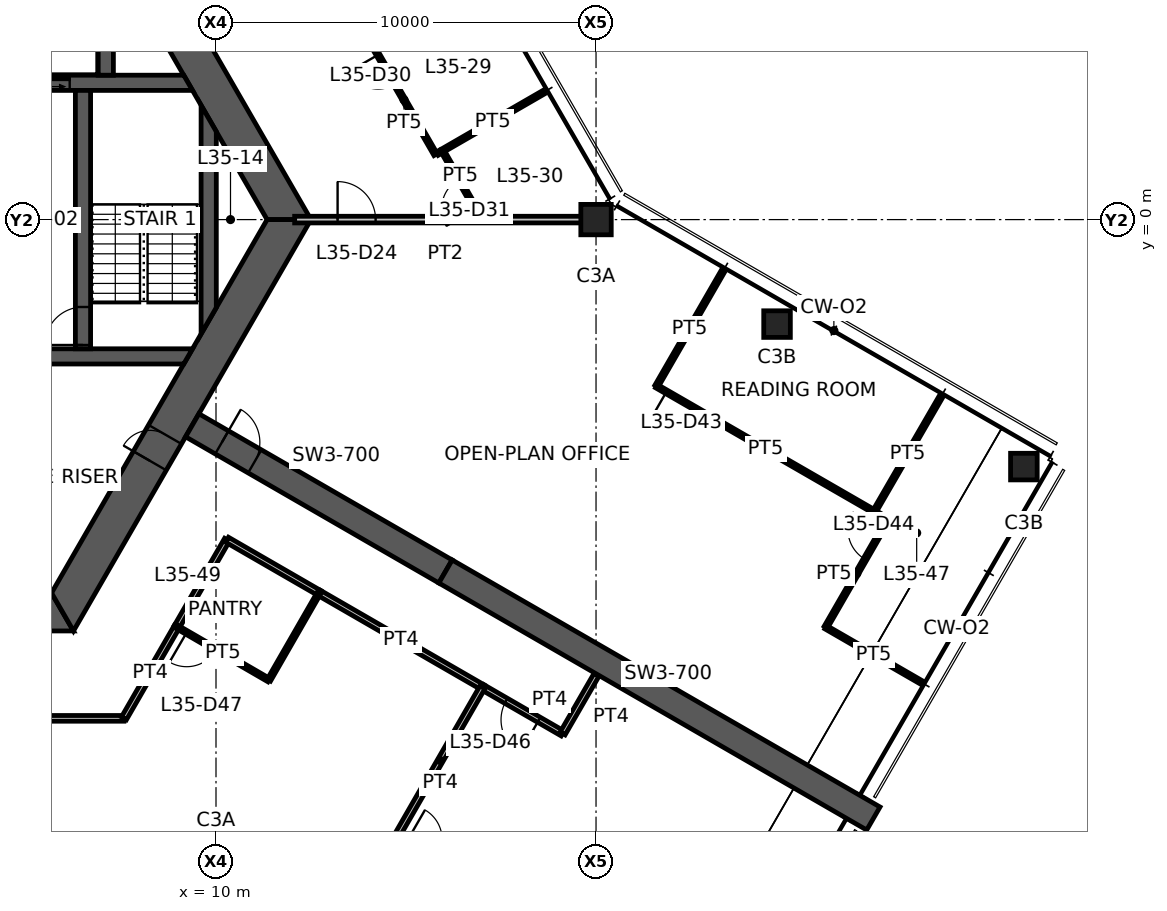
"""IFC4 building model, lengths in metres.
Left out: names, types, materials, properties, quantities, classifications, styles, units other than length and angle.
Written with IfcOpenShell. Run it as: python <this file> out.ifc"""

import sys

from ifc_helpers import new_model, si_unit, direction, frame, frame_2d, origin, origin_2d, place, context, subcontext, project, spatial, polyline, rectangle, hollow_rectangle, outline, extrude, element, fill, save


model = new_model("IFC4")
c1 = context("Model", 3, precision=1e-05, world=origin(), true_north=direction((0.0, 1.0)))
c2 = subcontext(c1, "Body", "Model", "MODEL_VIEW")
j1 = project(units=[si_unit("LENGTHUNIT", "METRE"), si_unit("PLANEANGLEUNIT", "RADIAN")], contexts=[c1])
p1 = place(None, origin())
s1 = spatial("IfcSite", under=j1, at=p1, CompositionType="ELEMENT")
p2 = place(p1, origin())
s2 = spatial("IfcBuilding", under=s1, at=p2, CompositionType="ELEMENT")
p3 = place(p2, frame((0.0, 0.0, 140.9)))
s3 = spatial("IfcBuildingStorey", under=s2, at=p3, CompositionType="ELEMENT", Elevation=140.9)
p4 = place(p3, frame((20.0, 0.0, 0.0), z_axis=(0.0, 0.0, 1.0), x_axis=(1.0, 0.0, 0.0)))
e1 = element("IfcColumn", 1, at=p4, inside=s3, PredefinedType="COLUMN", context=c2, shape_type="SweptSolid", body=[
    extrude(hollow_rectangle(XDim=0.8, YDim=0.8, WallThickness=0.045, at=origin_2d()), origin(), (0.0, 0.0, 1.0), 3.9),
])
for number, where, z_axis, x_axis in (
    (2, (24.763, -2.75, 0.0), (0.0, 0.0, 1.0), (1.0, 0.0, 0.0)),
    (3, (31.258, -6.5, 0.0), (0.0, 0.0, 1.0), (1.0, 0.0, 0.0)),
):
    element("IfcColumn", number, at=place(p3, frame(where, z_axis=z_axis, x_axis=x_axis)), inside=s3, PredefinedType="COLUMN", context=c2, shape_type="SweptSolid", body=[
        extrude(hollow_rectangle(XDim=0.7, YDim=0.7, WallThickness=0.036, at=origin_2d()), origin(), (0.0, 0.0, 1.0), 3.9),
    ])
p5 = place(p3, frame((11.922, 0.0, 0.0), z_axis=(0.0, 0.0, 1.0), x_axis=(-0.500004296715, 0.866022923061, 0.0)))
e4 = element("IfcWall", 4, at=p5, inside=s3, PredefinedType="SHEAR", context=c2, shape_type="SweptSolid", body=[
    extrude(outline(polyline([(-0.289, -0.5), (5.835, -0.5), (6.635, -0.5), (12.211, -0.5), (11.634, 0.5), (6.635, 0.5), (5.835, 0.5), (0.289, 0.5), (-0.289, -0.5)])), origin(), (0.0, 0.0, 1.0), 3.9),
])
p6 = place(p5, frame((5.835, 0.0, 0.0)))
e5 = element("IfcOpeningElement", 5, at=p6, cuts=e4, PredefinedType="OPENING", context=c2, shape_type="SweptSolid", body=[
    extrude(rectangle(XDim=0.8, YDim=2.1, at=frame_2d((0.4, 1.05))), frame((0.0, 0.51, 0.0), z_axis=(0.0, -1.0, 0.0), x_axis=(1.0, 0.0, 0.0)), (0.0, 0.0, 1.0), 1.02),
])
p7 = place(p3, frame((-5.961, -10.325, 0.0), z_axis=(0.0, 0.0, 1.0), x_axis=(1.0, 0.0, 0.0)))
e6 = element("IfcWall", 6, at=p7, inside=s3, PredefinedType="SHEAR", context=c2, shape_type="SweptSolid", body=[
    extrude(outline(polyline([(-0.289, -0.5), (5.461, -0.5), (6.461, -0.5), (12.211, -0.5), (11.634, 0.5), (6.461, 0.5), (5.461, 0.5), (0.289, 0.5), (-0.289, -0.5)])), origin(), (0.0, 0.0, 1.0), 3.9),
])
p8 = place(p7, frame((5.461, 0.0, 0.0)))
e7 = element("IfcOpeningElement", 7, at=p8, cuts=e6, PredefinedType="OPENING", context=c2, shape_type="SweptSolid", body=[
    extrude(rectangle(XDim=1.0, YDim=2.1, at=frame_2d((0.5, 1.05))), frame((0.0, 0.51, 0.0), z_axis=(0.0, -1.0, 0.0), x_axis=(1.0, 0.0, 0.0)), (0.0, 0.0, 1.0), 1.02),
])
p9 = place(p3, frame((5.961, -10.325, 0.0), z_axis=(0.0, 0.0, 1.0), x_axis=(0.500004296715, 0.866022923061, 0.0)))
e8 = element("IfcWall", 8, at=p9, inside=s3, PredefinedType="SHEAR", context=c2, shape_type="SweptSolid", body=[
    extrude(outline(polyline([(-0.289, -0.5), (4.594, -0.5), (5.394, -0.5), (12.211, -0.5), (11.634, 0.5), (5.394, 0.5), (4.594, 0.5), (0.289, 0.5), (-0.289, -0.5)])), origin(), (0.0, 0.0, 1.0), 3.9),
])
p10 = place(p9, frame((4.594, 0.0, 0.0)))
e9 = element("IfcOpeningElement", 9, at=p10, cuts=e8, PredefinedType="OPENING", context=c2, shape_type="SweptSolid", body=[
    extrude(rectangle(XDim=0.8, YDim=2.1, at=frame_2d((0.4, 1.05))), frame((0.0, 0.51, 0.0), z_axis=(0.0, -1.0, 0.0), x_axis=(1.0, 0.0, 0.0)), (0.0, 0.0, 1.0), 1.02),
])
p11 = place(p3, frame((9.375, -5.413, 0.0), z_axis=(0.0, 0.0, 1.0), x_axis=(0.866032377459, -0.499987921047, 0.0)))
e10 = element("IfcWall", 10, at=p11, inside=s3, PredefinedType="SHEAR", context=c2, shape_type="SweptSolid", body=[
    extrude(rectangle(XDim=7.696, YDim=0.7, at=frame_2d((3.848, 0.0))), origin(), (0.0, 0.0, 1.0), 3.9),
])
p12 = place(p11, frame((0.9, 0.0, 0.0)))
e11 = element("IfcOpeningElement", 11, at=p12, cuts=e10, PredefinedType="OPENING", context=c2, shape_type="SweptSolid", body=[
    extrude(rectangle(XDim=1.0, YDim=2.1, at=frame_2d((0.5, 1.05))), frame((0.0, 0.36, 0.0), z_axis=(0.0, -1.0, 0.0), x_axis=(1.0, 0.0, 0.0)), (0.0, 0.0, 1.0), 0.72),
])
p13 = place(p3, frame((16.039, -9.26, 0.0), z_axis=(0.0, 0.0, 1.0), x_axis=(0.866024837091, -0.50000098154, 0.0)))
e12 = element("IfcWall", 12, at=p13, inside=s3, PredefinedType="SHEAR", context=c2, shape_type="SweptSolid", body=[
    extrude(rectangle(XDim=13.0, YDim=0.7, at=frame_2d((6.5, 0.0))), origin(), (0.0, 0.0, 1.0), 3.9),
])
p14 = place(p3, frame((1.4, 3.6, 0.0), z_axis=(0.0, 0.0, 1.0), x_axis=(1.0, 0.0, 0.0)))
e13 = element("IfcWall", 13, at=p14, inside=s3, PredefinedType="SHEAR", context=c2, shape_type="SweptSolid", body=[
    extrude(outline(polyline([(0.0, -0.2), (3.45, -0.2), (4.75, -0.2), (7.982, -0.2), (7.751, 0.2), (4.75, 0.2), (3.45, 0.2), (0.0, 0.2), (0.0, -0.2)])), origin(), (0.0, 0.0, 1.0), 3.9),
])
p15 = place(p14, frame((3.45, 0.0, 0.0)))
e14 = element("IfcOpeningElement", 14, at=p15, cuts=e13, PredefinedType="OPENING", context=c2, shape_type="SweptSolid", body=[
    extrude(rectangle(XDim=1.3, YDim=2.1, at=frame_2d((0.65, 1.05))), frame((0.0, 0.21, 0.0), z_axis=(0.0, -1.0, 0.0), x_axis=(1.0, 0.0, 0.0)), (0.0, 0.0, 1.0), 0.42),
])
p16 = place(p3, frame((1.4, -3.6, 0.0), z_axis=(0.0, 0.0, 1.0), x_axis=(1.0, 0.0, 0.0)))
e15 = element("IfcWall", 15, at=p16, inside=s3, PredefinedType="SHEAR", context=c2, shape_type="SweptSolid", body=[
    extrude(outline(polyline([(0.0, -0.2), (1.1, -0.2), (2.2, -0.2), (7.751, -0.2), (7.982, 0.2), (2.2, 0.2), (1.1, 0.2), (0.0, 0.2), (0.0, -0.2)])), origin(), (0.0, 0.0, 1.0), 3.9),
])
p17 = place(p16, frame((1.1, 0.0, 0.0)))
e16 = element("IfcOpeningElement", 16, at=p17, cuts=e15, PredefinedType="OPENING", context=c2, shape_type="SweptSolid", body=[
    extrude(rectangle(XDim=1.1, YDim=2.1, at=frame_2d((0.55, 1.05))), frame((0.0, 0.21, 0.0), z_axis=(0.0, -1.0, 0.0), x_axis=(1.0, 0.0, 0.0)), (0.0, 0.0, 1.0), 0.42),
])
p18 = place(p3, frame((6.5, -3.4, 0.0), z_axis=(0.0, 0.0, 1.0), x_axis=(0.0, 1.0, 0.0)))
e17 = element("IfcWall", 17, at=p18, inside=s3, PredefinedType="SHEAR", context=c2, shape_type="SweptSolid", body=[
    extrude(rectangle(XDim=6.8, YDim=0.4, at=frame_2d((3.4, 0.0))), origin(), (0.0, 0.0, 1.0), 3.9),
])
p19 = place(p18, frame((0.1, 0.0, 0.0)))
e18 = element("IfcOpeningElement", 18, at=p19, cuts=e17, PredefinedType="OPENING", context=c2, shape_type="SweptSolid", body=[
    extrude(rectangle(XDim=1.0, YDim=2.1, at=frame_2d((0.5, 1.05))), frame((0.0, 0.21, 0.0), z_axis=(0.0, -1.0, 0.0), x_axis=(1.0, 0.0, 0.0)), (0.0, 0.0, 1.0), 0.42),
])
p20 = place(p3, frame((7.1, 3.8, 0.0), z_axis=(0.0, 0.0, 1.0), x_axis=(0.0, 1.0, 0.0)))
e19 = element("IfcWall", 19, at=p20, inside=s3, PredefinedType="SHEAR", context=c2, shape_type="SweptSolid", body=[
    extrude(outline(polyline([(0.0, -0.2), (3.206, -0.2), (3.4, 0.0), (3.4, 0.2), (0.0, 0.2), (0.0, -0.2)])), origin(), (0.0, 0.0, 1.0), 3.9),
])
p21 = place(p3, frame((9.808, -2.662, 0.0), z_axis=(0.0, 0.0, 1.0), x_axis=(0.0, 1.0, 0.0)))
e20 = element("IfcWall", 20, at=p21, inside=s3, PredefinedType="SHEAR", context=c2, shape_type="SweptSolid", body=[
    extrude(outline(polyline([(0.346, -0.2), (4.978, -0.2), (5.671, 0.2), (-0.346, 0.2), (0.346, -0.2)])), origin(), (0.0, 0.0, 1.0), 3.9),
])
p22 = place(p3, frame((12.07, 0.0, 0.0), z_axis=(0.0, 0.0, 1.0), x_axis=(1.0, 0.0, 0.0)))
e21 = element("IfcWall", 21, at=p22, inside=s3, PredefinedType="PARTITIONING", context=c2, shape_type="SweptSolid", body=[
    extrude(rectangle(XDim=7.93, YDim=0.175, at=frame_2d((3.965, 0.0))), origin(), (0.0, 0.0, 1.0), 3.05),
])
p23 = place(p22, frame((1.13, 0.0, 0.0)))
e22 = element("IfcOpeningElement", 22, at=p23, cuts=e21, PredefinedType="OPENING", context=c2, shape_type="SweptSolid", body=[
    extrude(rectangle(XDim=1.0, YDim=2.1, at=frame_2d((0.5, 1.05))), frame((0.0, 0.098, 0.0), z_axis=(0.0, -1.0, 0.0), x_axis=(1.0, 0.0, 0.0)), (0.0, 0.0, 1.0), 0.195),
])
p24 = place(p3, frame((18.62, 3.351, 0.0), z_axis=(0.0, 0.0, 1.0), x_axis=(-0.866043267704, -0.499969057507, 0.0)))
e23 = element("IfcWall", 23, at=p24, inside=s3, PredefinedType="PARTITIONING", context=c2, shape_type="SweptSolid", body=[
    extrude(rectangle(XDim=3.085, YDim=0.1, at=frame_2d((1.542, 0.0))), origin(), (0.0, 0.0, 1.0), 2.95),
])
p25 = place(p3, frame((15.779, 1.71, 0.0), z_axis=(0.0, 0.0, 1.0), x_axis=(-0.500001606164, 0.866024476463, 0.0)))
e24 = element("IfcWall", 24, at=p25, inside=s3, PredefinedType="PARTITIONING", context=c2, shape_type="SweptSolid", body=[
    extrude(rectangle(XDim=3.331, YDim=0.1, at=frame_2d((1.666, 0.0))), origin(), (0.0, 0.0, 1.0), 2.95),
])
p26 = place(p25, frame((2.131, 0.0, 0.0)))
e25 = element("IfcOpeningElement", 25, at=p26, cuts=e24, PredefinedType="OPENING", context=c2, shape_type="SweptSolid", body=[
    extrude(rectangle(XDim=0.9, YDim=2.1, at=frame_2d((0.45, 1.05))), frame((0.0, 0.06, 0.0), z_axis=(0.0, -1.0, 0.0), x_axis=(1.0, 0.0, 0.0)), (0.0, 0.0, 1.0), 0.12),
])
p27 = place(p3, frame((16.986, 0.02, 0.0), z_axis=(0.0, 0.0, 1.0), x_axis=(-0.498096123952, 0.867121820337, 0.0)))
e26 = element("IfcWall", 26, at=p27, inside=s3, PredefinedType="PARTITIONING", context=c2, shape_type="SweptSolid", body=[
    extrude(rectangle(XDim=2.067, YDim=0.1, at=frame_2d((1.034, 0.0))), origin(), (0.0, 0.0, 1.0), 2.95),
])
p28 = place(p27, frame((0.3, 0.0, 0.0)))
e27 = element("IfcOpeningElement", 27, at=p28, cuts=e26, PredefinedType="OPENING", context=c2, shape_type="SweptSolid", body=[
    extrude(rectangle(XDim=0.9, YDim=2.1, at=frame_2d((0.45, 1.05))), frame((0.0, 0.06, 0.0), z_axis=(0.0, -1.0, 0.0), x_axis=(1.0, 0.0, 0.0)), (0.0, 0.0, 1.0), 0.12),
])
p29 = place(p3, frame((29.077, -4.658, 0.0), z_axis=(0.0, 0.0, 1.0), x_axis=(-0.501313567819, -0.865265685625, 0.0)))
e28 = element("IfcWall", 28, at=p29, inside=s3, PredefinedType="PARTITIONING", context=c2, shape_type="SweptSolid", body=[
    extrude(rectangle(XDim=3.505, YDim=0.1, at=frame_2d((1.752, 0.0))), origin(), (0.0, 0.0, 1.0), 2.95),
])
p30 = place(p3, frame((21.592, -4.383, 0.0), z_axis=(0.0, 0.0, 1.0), x_axis=(0.500009906705, 0.86601968407, 0.0)))
e29 = element("IfcWall", 29, at=p30, inside=s3, PredefinedType="PARTITIONING", context=c2, shape_type="SweptSolid", body=[
    extrude(rectangle(XDim=3.48, YDim=0.1, at=frame_2d((1.74, 0.0))), origin(), (0.0, 0.0, 1.0), 2.95),
])
p31 = place(p3, frame((27.327, -7.69, 0.0), z_axis=(0.0, 0.0, 1.0), x_axis=(-0.866318796728, 0.499491483847, 0.0)))
e30 = element("IfcWall", 30, at=p31, inside=s3, PredefinedType="PARTITIONING", context=c2, shape_type="SweptSolid", body=[
    extrude(rectangle(XDim=6.62, YDim=0.1, at=frame_2d((3.31, 0.0))), origin(), (0.0, 0.0, 1.0), 2.95),
])
p32 = place(p31, frame((5.42, 0.0, 0.0)))
e31 = element("IfcOpeningElement", 31, at=p32, cuts=e30, PredefinedType="OPENING", context=c2, shape_type="SweptSolid", body=[
    extrude(rectangle(XDim=0.9, YDim=2.1, at=frame_2d((0.45, 1.05))), frame((0.0, 0.06, 0.0), z_axis=(0.0, -1.0, 0.0), x_axis=(1.0, 0.0, 0.0)), (0.0, 0.0, 1.0), 0.12),
])
p33 = place(p3, frame((26.046, -10.727, 0.0), z_axis=(0.0, 0.0, 1.0), x_axis=(0.499765599164, 0.866160692881, 0.0)))
e32 = element("IfcWall", 32, at=p33, inside=s3, PredefinedType="PARTITIONING", context=c2, shape_type="SweptSolid", body=[
    extrude(rectangle(XDim=3.266, YDim=0.1, at=frame_2d((1.633, 0.0))), origin(), (0.0, 0.0, 1.0), 2.95),
])
p34 = place(p33, frame((2.066, 0.0, 0.0)))
e33 = element("IfcOpeningElement", 33, at=p34, cuts=e32, PredefinedType="OPENING", context=c2, shape_type="SweptSolid", body=[
    extrude(rectangle(XDim=0.9, YDim=2.1, at=frame_2d((0.45, 1.05))), frame((0.0, 0.06, 0.0), z_axis=(0.0, -1.0, 0.0), x_axis=(1.0, 0.0, 0.0)), (0.0, 0.0, 1.0), 0.12),
])
p35 = place(p3, frame((27.678, -7.898, 0.0), z_axis=(0.0, 0.0, 1.0), x_axis=(-0.859748322004, 0.510717948394, 0.0)))
e34 = element("IfcWall", 34, at=p35, inside=s3, PredefinedType="PARTITIONING", context=c2, shape_type="SweptSolid", body=[
    extrude(rectangle(XDim=0.409, YDim=0.1, at=frame_2d((0.205, 0.0))), origin(), (0.0, 0.0, 1.0), 2.95),
])
p36 = place(p3, frame((28.562, -12.18, 0.0), z_axis=(0.0, 0.0, 1.0), x_axis=(-0.866031657677, 0.499989167784, 0.0)))
e35 = element("IfcWall", 35, at=p36, inside=s3, PredefinedType="PARTITIONING", context=c2, shape_type="SweptSolid", body=[
    extrude(rectangle(XDim=2.905, YDim=0.1, at=frame_2d((1.453, 0.0))), origin(), (0.0, 0.0, 1.0), 2.95),
])
p37 = place(p3, frame((10.292, -8.425, 0.0), z_axis=(0.0, 0.0, 1.0), x_axis=(-0.499966561876, -0.866044708433, 0.0)))
e36 = element("IfcWall", 36, at=p37, inside=s3, PredefinedType="PARTITIONING", context=c2, shape_type="SweptSolid", body=[
    extrude(rectangle(XDim=2.655, YDim=0.15, at=frame_2d((1.328, 0.0))), origin(), (0.0, 0.0, 1.0), 2.95),
])
p38 = place(p3, frame((12.721, -9.827, 0.0), z_axis=(0.0, 0.0, 1.0), x_axis=(-0.866049342339, 0.499958534914, 0.0)))
e37 = element("IfcWall", 37, at=p38, inside=s3, PredefinedType="PARTITIONING", context=c2, shape_type="SweptSolid", body=[
    extrude(rectangle(XDim=2.805, YDim=0.15, at=frame_2d((1.402, 0.0))), origin(), (0.0, 0.0, 1.0), 2.95),
])
p39 = place(p3, frame((7.578, -13.125, 0.0), z_axis=(0.0, 0.0, 1.0), x_axis=(-1.0, 0.0, 0.0)))
e38 = element("IfcWall", 38, at=p39, inside=s3, PredefinedType="PARTITIONING", context=c2, shape_type="SweptSolid", body=[
    extrude(rectangle(XDim=9.422, YDim=0.15, at=frame_2d((4.711, 0.0))), origin(), (0.0, 0.0, 1.0), 2.95),
])
p40 = place(p39, frame((4.211, 0.0, 0.0)))
e39 = element("IfcOpeningElement", 39, at=p40, cuts=e38, PredefinedType="OPENING", context=c2, shape_type="SweptSolid", body=[
    extrude(rectangle(XDim=1.0, YDim=2.1, at=frame_2d((0.5, 1.05))), frame((0.0, 0.085, 0.0), z_axis=(0.0, -1.0, 0.0), x_axis=(1.0, 0.0, 0.0)), (0.0, 0.0, 1.0), 0.17),
])
p41 = place(p3, frame((8.969, -10.716, 0.0), z_axis=(0.0, 0.0, 1.0), x_axis=(-0.500008568482, -0.866020456713, 0.0)))
e40 = element("IfcWall", 40, at=p41, inside=s3, PredefinedType="PARTITIONING", context=c2, shape_type="SweptSolid", body=[
    extrude(rectangle(XDim=2.782, YDim=0.15, at=frame_2d((1.391, 0.0))), origin(), (0.0, 0.0, 1.0), 2.95),
])
p42 = place(p3, frame((17.021, -12.31, 0.0), z_axis=(0.0, 0.0, 1.0), x_axis=(-0.866018071205, 0.500012700186, 0.0)))
e41 = element("IfcWall", 41, at=p42, inside=s3, PredefinedType="PARTITIONING", context=c2, shape_type="SweptSolid", body=[
    extrude(rectangle(XDim=4.975, YDim=0.15, at=frame_2d((2.488, 0.0))), origin(), (0.0, 0.0, 1.0), 2.95),
])
p43 = place(p3, frame((19.121, -13.522, 0.0), z_axis=(0.0, 0.0, 1.0), x_axis=(-0.866000196749, 0.500043657324, 0.0)))
e42 = element("IfcWall", 42, at=p43, inside=s3, PredefinedType="PARTITIONING", context=c2, shape_type="SweptSolid", body=[
    extrude(rectangle(XDim=2.434, YDim=0.15, at=frame_2d((1.217, 0.0))), origin(), (0.0, 0.0, 1.0), 2.95),
])
p44 = place(p43, frame((0.717, 0.0, 0.0)))
e43 = element("IfcOpeningElement", 43, at=p44, cuts=e42, PredefinedType="OPENING", context=c2, shape_type="SweptSolid", body=[
    extrude(rectangle(XDim=1.0, YDim=2.1, at=frame_2d((0.5, 1.05))), frame((0.0, 0.085, 0.0), z_axis=(0.0, -1.0, 0.0), x_axis=(1.0, 0.0, 0.0)), (0.0, 0.0, 1.0), 0.17),
])
p45 = place(p3, frame((20.011, -11.981, 0.0), z_axis=(0.0, 0.0, 1.0), x_axis=(-0.500062787734, -0.865989150234, 0.0)))
e44 = element("IfcWall", 44, at=p45, inside=s3, PredefinedType="PARTITIONING", context=c2, shape_type="SweptSolid", body=[
    extrude(rectangle(XDim=1.78, YDim=0.15, at=frame_2d((0.89, 0.0))), origin(), (0.0, 0.0, 1.0), 2.95),
])
p46 = place(p3, frame((11.392, -12.119, 0.0), z_axis=(0.0, 0.0, 1.0), x_axis=(-0.865255114713, 0.501331812737, 0.0)))
e45 = element("IfcWall", 45, at=p46, inside=s3, PredefinedType="PARTITIONING", context=c2, shape_type="SweptSolid", body=[
    extrude(rectangle(XDim=2.8, YDim=0.1, at=frame_2d((1.4, 0.0))), origin(), (0.0, 0.0, 1.0), 2.95),
])
p47 = place(p46, frame((1.6, 0.0, 0.0)))
e46 = element("IfcOpeningElement", 46, at=p47, cuts=e45, PredefinedType="OPENING", context=c2, shape_type="SweptSolid", body=[
    extrude(rectangle(XDim=0.9, YDim=2.1, at=frame_2d((0.45, 1.05))), frame((0.0, 0.06, 0.0), z_axis=(0.0, -1.0, 0.0), x_axis=(1.0, 0.0, 0.0)), (0.0, 0.0, 1.0), 0.12),
])
p48 = place(p3, frame((12.713, -9.822, 0.0), z_axis=(0.0, 0.0, 1.0), x_axis=(-0.49852824611, -0.866873455488, 0.0)))
e47 = element("IfcWall", 47, at=p48, inside=s3, PredefinedType="PARTITIONING", context=c2, shape_type="SweptSolid", body=[
    extrude(rectangle(XDim=2.65, YDim=0.1, at=frame_2d((1.325, 0.0))), origin(), (0.0, 0.0, 1.0), 2.95),
])
p49 = place(p3, frame((17.013, -12.305, 0.0), z_axis=(0.0, 0.0, 1.0), x_axis=(-0.499081704511, -0.866554933182, 0.0)))
e48 = element("IfcWall", 48, at=p49, inside=s3, PredefinedType="PARTITIONING", context=c2, shape_type="SweptSolid", body=[
    extrude(rectangle(XDim=4.454, YDim=0.15, at=frame_2d((2.227, 0.0))), origin(), (0.0, 0.0, 1.0), 2.95),
])
p50 = place(p3, frame((15.823, 1.735, 0.0), z_axis=(0.0, 0.0, 1.0), x_axis=(0.867234405398, 0.497900076415, 0.0)))
e49 = element("IfcWall", 49, at=p50, inside=s3, PredefinedType="PARTITIONING", context=c2, shape_type="SweptSolid", body=[
    extrude(rectangle(XDim=0.104, YDim=0.1, at=frame_2d((0.052, 0.0))), origin(), (0.0, 0.0, 1.0), 2.95),
])
p51 = place(p10, origin())
e50 = element("IfcDoor", 50, at=p51, inside=s3, OperationType="SINGLE_SWING_LEFT", PredefinedType="DOOR", context=c2, shape_type="SweptSolid", body=[
    extrude(rectangle(XDim=0.8, YDim=2.1, at=frame_2d((0.4, 1.05))), frame((0.0, 0.025, 0.0), z_axis=(0.0, -1.0, 0.0), x_axis=(1.0, 0.0, 0.0)), (0.0, 0.0, 1.0), 0.05),
])
fill(e9, e50)
p52 = place(p19, origin())
e51 = element("IfcDoor", 51, at=p52, inside=s3, OperationType="SINGLE_SWING_LEFT", PredefinedType="DOOR", context=c2, shape_type="SweptSolid", body=[
    extrude(rectangle(XDim=1.0, YDim=2.1, at=frame_2d((0.5, 1.05))), frame((0.0, 0.025, 0.0), z_axis=(0.0, -1.0, 0.0), x_axis=(1.0, 0.0, 0.0)), (0.0, 0.0, 1.0), 0.05),
])
fill(e18, e51)
p53 = place(p12, origin())
e52 = element("IfcDoor", 52, at=p53, inside=s3, OperationType="SINGLE_SWING_LEFT", PredefinedType="DOOR", context=c2, shape_type="SweptSolid", body=[
    extrude(rectangle(XDim=1.0, YDim=2.1, at=frame_2d((0.5, 1.05))), frame((0.0, 0.025, 0.0), z_axis=(0.0, -1.0, 0.0), x_axis=(1.0, 0.0, 0.0)), (0.0, 0.0, 1.0), 0.05),
])
fill(e11, e52)
p54 = place(p23, origin())
e53 = element("IfcDoor", 53, at=p54, inside=s3, OperationType="SINGLE_SWING_LEFT", PredefinedType="DOOR", context=c2, shape_type="SweptSolid", body=[
    extrude(rectangle(XDim=1.0, YDim=2.1, at=frame_2d((0.5, 1.05))), frame((0.0, 0.025, 0.0), z_axis=(0.0, -1.0, 0.0), x_axis=(1.0, 0.0, 0.0)), (0.0, 0.0, 1.0), 0.05),
])
fill(e22, e53)
p55 = place(p26, origin())
e54 = element("IfcDoor", 54, at=p55, inside=s3, OperationType="SINGLE_SWING_RIGHT", PredefinedType="DOOR", context=c2, shape_type="SweptSolid", body=[
    extrude(rectangle(XDim=0.9, YDim=2.1, at=frame_2d((0.45, 1.05))), frame((0.0, 0.025, 0.0), z_axis=(0.0, -1.0, 0.0), x_axis=(1.0, 0.0, 0.0)), (0.0, 0.0, 1.0), 0.05),
])
fill(e25, e54)
p56 = place(p28, origin())
e55 = element("IfcDoor", 55, at=p56, inside=s3, OperationType="SINGLE_SWING_LEFT", PredefinedType="DOOR", context=c2, shape_type="SweptSolid", body=[
    extrude(rectangle(XDim=0.9, YDim=2.1, at=frame_2d((0.45, 1.05))), frame((0.0, 0.025, 0.0), z_axis=(0.0, -1.0, 0.0), x_axis=(1.0, 0.0, 0.0)), (0.0, 0.0, 1.0), 0.05),
])
fill(e27, e55)
p57 = place(p32, origin())
e56 = element("IfcDoor", 56, at=p57, inside=s3, OperationType="SINGLE_SWING_RIGHT", PredefinedType="DOOR", context=c2, shape_type="SweptSolid", body=[
    extrude(rectangle(XDim=0.9, YDim=2.1, at=frame_2d((0.45, 1.05))), frame((0.0, 0.025, 0.0), z_axis=(0.0, -1.0, 0.0), x_axis=(1.0, 0.0, 0.0)), (0.0, 0.0, 1.0), 0.05),
])
fill(e31, e56)
p58 = place(p34, origin())
e57 = element("IfcDoor", 57, at=p58, inside=s3, OperationType="SINGLE_SWING_RIGHT", PredefinedType="DOOR", context=c2, shape_type="SweptSolid", body=[
    extrude(rectangle(XDim=0.9, YDim=2.1, at=frame_2d((0.45, 1.05))), frame((0.0, 0.025, 0.0), z_axis=(0.0, -1.0, 0.0), x_axis=(1.0, 0.0, 0.0)), (0.0, 0.0, 1.0), 0.05),
])
fill(e33, e57)
p59 = place(p44, origin())
e58 = element("IfcDoor", 58, at=p59, inside=s3, OperationType="SINGLE_SWING_LEFT", PredefinedType="DOOR", context=c2, shape_type="SweptSolid", body=[
    extrude(rectangle(XDim=1.0, YDim=2.1, at=frame_2d((0.5, 1.05))), frame((0.0, 0.025, 0.0), z_axis=(0.0, -1.0, 0.0), x_axis=(1.0, 0.0, 0.0)), (0.0, 0.0, 1.0), 0.05),
])
fill(e43, e58)
p60 = place(p47, origin())
e59 = element("IfcDoor", 59, at=p60, inside=s3, OperationType="SINGLE_SWING_RIGHT", PredefinedType="DOOR", context=c2, shape_type="SweptSolid", body=[
    extrude(rectangle(XDim=0.9, YDim=2.1, at=frame_2d((0.45, 1.05))), frame((0.0, 0.025, 0.0), z_axis=(0.0, -1.0, 0.0), x_axis=(1.0, 0.0, 0.0)), (0.0, 0.0, 1.0), 0.05),
])
fill(e46, e59)
p61 = place(p15, origin())
e60 = element("IfcDoor", 60, at=p61, inside=s3, OperationType="DOUBLE_DOOR_SLIDING", PredefinedType="DOOR", context=c2, shape_type="SweptSolid", body=[
    extrude(rectangle(XDim=1.3, YDim=2.1, at=frame_2d((0.65, 1.05))), frame((0.0, 0.025, 0.0), z_axis=(0.0, -1.0, 0.0), x_axis=(1.0, 0.0, 0.0)), (0.0, 0.0, 1.0), 0.05),
])
fill(e14, e60)
save(model, sys.argv[1])
